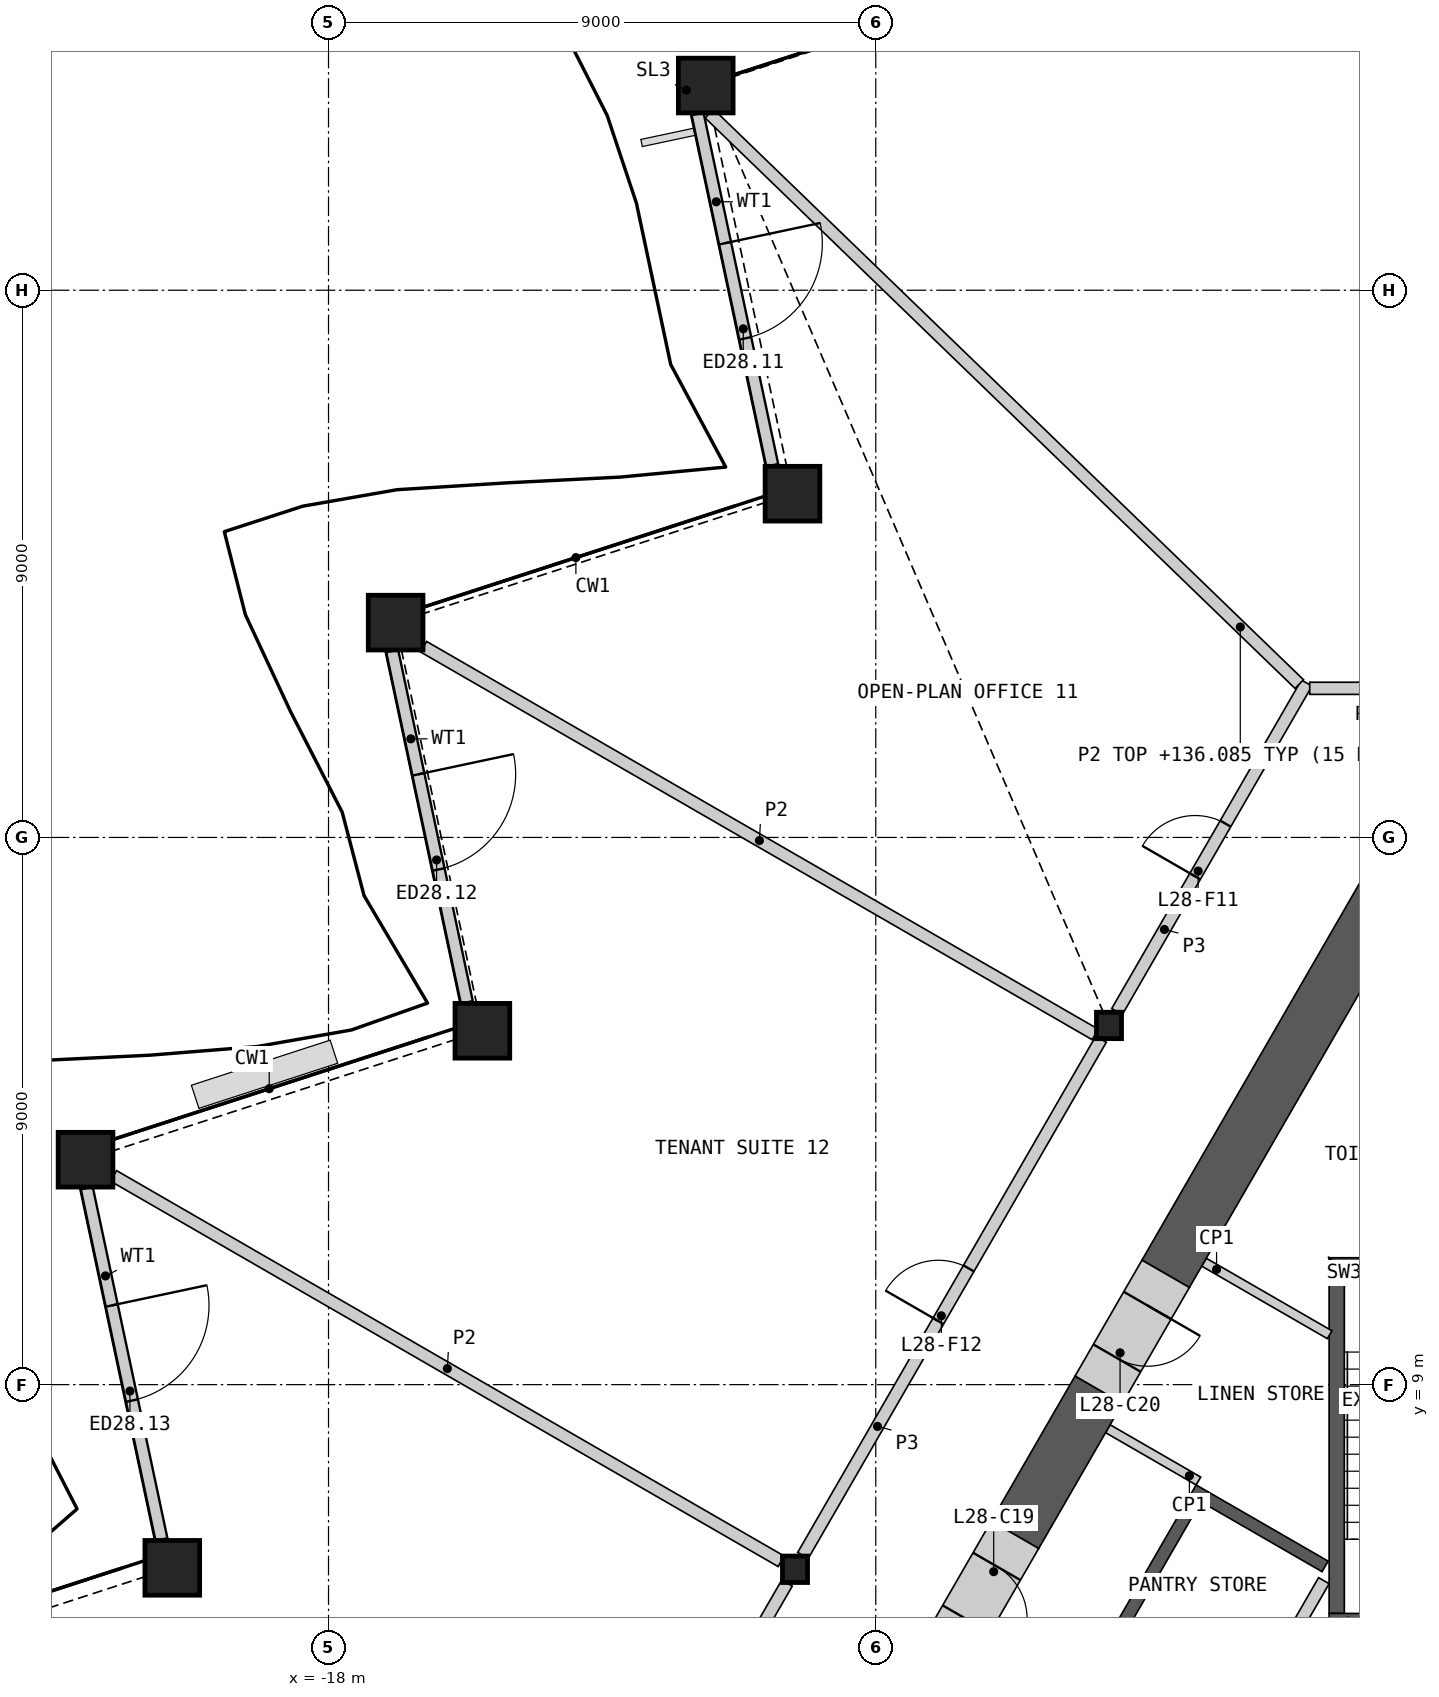
"""IFC4 building model, lengths in metres.
Left out: names, types, materials, properties, quantities, classifications, styles, units other than length and angle.
Written with IfcOpenShell. Run it as: python <this file> out.ifc"""

import sys

from ifc_helpers import new_model, si_unit, direction, frame, frame_2d, origin, origin_2d, place, context, subcontext, project, spatial, polyline, rectangle, hollow_rectangle, i_section, outline, extrude, element, fill, save


model = new_model("IFC4")
c1 = context("Model", 3, precision=1e-05, world=origin(), true_north=direction((0.0, 1.0)))
c2 = subcontext(c1, "Body", "Model", "MODEL_VIEW")
j1 = project(units=[si_unit("LENGTHUNIT", "METRE"), si_unit("PLANEANGLEUNIT", "RADIAN")], contexts=[c1])
p1 = place(None, origin())
s1 = spatial("IfcSite", under=j1, at=p1, CompositionType="ELEMENT")
p2 = place(p1, origin())
s2 = spatial("IfcBuilding", under=s1, at=p2, CompositionType="ELEMENT")
p3 = place(p2, frame((0.0, 0.0, 133.2)))
s3 = spatial("IfcBuildingStorey", under=s2, at=p3, CompositionType="ELEMENT", Elevation=133.2)
for number, where, z_axis, x_axis in (
    (1, (-11.796, 30.366, 0.0), (0.0, 0.0, 1.0), (1.0, 0.0, 0.0)),
    (2, (-10.37, 23.654, 0.0), (0.0, 0.0, 1.0), (1.0, 0.0, 0.0)),
    (3, (-16.896, 21.533, 0.0), (0.0, 0.0, 1.0), (1.0, 0.0, 0.0)),
    (4, (-15.469, 14.82, 0.0), (0.0, 0.0, 1.0), (1.0, 0.0, 0.0)),
    (5, (-21.996, 12.699, 0.0), (0.0, 0.0, 1.0), (1.0, 0.0, 0.0)),
    (6, (-20.57, 5.987, 0.0), (0.0, 0.0, 1.0), (1.0, 0.0, 0.0)),
):
    element("IfcColumn", number, at=place(p3, frame(where, z_axis=z_axis, x_axis=x_axis)), inside=s3, PredefinedType="COLUMN", context=c2, shape_type="SweptSolid", body=[
        extrude(hollow_rectangle(XDim=0.9, YDim=0.9, WallThickness=0.06, at=origin_2d()), origin(), (0.0, 0.0, 1.0), 4.2),
    ])
for number, where, z_axis, x_axis in (
    (7, (-5.164, 14.908, 0.0), (0.0, 0.0, 1.0), (1.0, 0.0, 0.0)),
    (8, (-10.328, 5.963, 0.0), (0.0, 0.0, 1.0), (1.0, 0.0, 0.0)),
):
    element("IfcColumn", number, at=place(p3, frame(where, z_axis=z_axis, x_axis=x_axis)), inside=s3, PredefinedType="COLUMN", context=c2, shape_type="SweptSolid", body=[
        extrude(i_section(OverallWidth=0.412, OverallDepth=0.435, WebThickness=0.036, FlangeThickness=0.057, at=origin_2d()), origin(), (0.0, 0.0, 1.0), 4.2),
    ])
p4 = place(p3, frame((-11.93, 29.9, 0.0), z_axis=(0.0, 0.0, 1.0), x_axis=(0.207917562075, -0.978146352741, 0.0)))
e9 = element("IfcWall", 9, at=p4, inside=s3, PredefinedType="SOLIDWALL", context=c2, shape_type="SweptSolid", body=[
    extrude(rectangle(XDim=5.909, YDim=0.2, at=frame_2d((2.954, 0.0))), origin(), (0.0, 0.0, 1.0), 3.189),
])
p5 = place(p4, frame((2.174, 0.0, 0.0)))
e10 = element("IfcOpeningElement", 10, at=p5, cuts=e9, PredefinedType="OPENING", context=c2, shape_type="SweptSolid", body=[
    extrude(rectangle(XDim=1.6, YDim=2.4, at=frame_2d((0.8, 1.2))), frame((0.0, 0.11, 0.0), z_axis=(0.0, -1.0, 0.0), x_axis=(1.0, 0.0, 0.0)), (0.0, 0.0, 1.0), 0.22),
])
p6 = place(p3, frame((-16.953, 21.066, 0.0), z_axis=(0.0, 0.0, 1.0), x_axis=(0.207917562075, -0.978146352741, 0.0)))
e11 = element("IfcWall", 11, at=p6, inside=s3, PredefinedType="SOLIDWALL", context=c2, shape_type="SweptSolid", body=[
    extrude(rectangle(XDim=5.909, YDim=0.2, at=frame_2d((2.954, 0.0))), origin(), (0.0, 0.0, 1.0), 3.189),
])
p7 = place(p6, frame((2.073, 0.0, 0.0)))
e12 = element("IfcOpeningElement", 12, at=p7, cuts=e11, PredefinedType="OPENING", context=c2, shape_type="SweptSolid", body=[
    extrude(rectangle(XDim=1.6, YDim=2.4, at=frame_2d((0.8, 1.2))), frame((0.0, 0.11, 0.0), z_axis=(0.0, -1.0, 0.0), x_axis=(1.0, 0.0, 0.0)), (0.0, 0.0, 1.0), 0.22),
])
p8 = place(p3, frame((-21.976, 12.233, 0.0), z_axis=(0.0, 0.0, 1.0), x_axis=(0.207925965623, -0.978144566421, 0.0)))
e13 = element("IfcWall", 13, at=p8, inside=s3, PredefinedType="SOLIDWALL", context=c2, shape_type="SweptSolid", body=[
    extrude(rectangle(XDim=5.908, YDim=0.2, at=frame_2d((2.954, 0.0))), origin(), (0.0, 0.0, 1.0), 3.189),
])
p9 = place(p8, frame((1.973, 0.0, 0.0)))
e14 = element("IfcOpeningElement", 14, at=p9, cuts=e13, PredefinedType="OPENING", context=c2, shape_type="SweptSolid", body=[
    extrude(rectangle(XDim=1.6, YDim=2.4, at=frame_2d((0.8, 1.2))), frame((0.0, 0.11, 0.0), z_axis=(0.0, -1.0, 0.0), x_axis=(1.0, 0.0, 0.0)), (0.0, 0.0, 1.0), 0.22),
])
p10 = place(p3, origin())
e15 = element("IfcWall", 15, at=p10, inside=s3, PredefinedType="SHEAR", context=c2, shape_type="SweptSolid", body=[
    extrude(outline(polyline([(-4.96, 0.208), (-7.131, 1.461), (-3.731, 7.35), (-1.561, 6.097), (-1.66, 5.924), (-3.652, 7.074), (-5.752, 3.437), (-3.76, 2.287), (-3.861, 2.113), (-5.852, 3.263), (-6.852, 1.531), (-4.861, 0.381), (-4.96, 0.208)])), origin(), (0.0, 0.0, 1.0), 3.8),
])
p11 = place(p3, frame((-1.631, 5.776, 0.0), z_axis=(0.0, 0.0, 1.0), x_axis=(-0.499992876559, -0.866029516466, 0.0)))
e16 = element("IfcWall", 16, at=p11, inside=s3, PredefinedType="SOLIDWALL", context=c2, shape_type="SweptSolid", body=[
    extrude(rectangle(XDim=6.486, YDim=0.2, at=frame_2d((3.243, 0.0))), origin(), (0.0, 0.0, 1.0), 3.8),
])
p12 = place(p11, frame((1.537, 0.0, 0.0)))
e17 = element("IfcOpeningElement", 17, at=p12, cuts=e16, PredefinedType="OPENING", context=c2, shape_type="SweptSolid", body=[
    extrude(rectangle(XDim=0.9, YDim=2.1, at=frame_2d((0.45, 1.05))), frame((0.0, 0.11, 0.0), z_axis=(0.0, -1.0, 0.0), x_axis=(1.0, 0.0, 0.0)), (0.0, 0.0, 1.0), 0.22),
])
p13 = place(p3, origin())
e18 = element("IfcWall", 18, at=p13, inside=s3, PredefinedType="SHEAR", context=c2, shape_type="SweptSolid", body=[
    extrude(outline(polyline([(1.544, 11.087), (-1.544, 11.087), (-1.294, 10.837), (1.294, 10.837), (1.544, 11.087)])), origin(), (0.0, 0.0, 1.0), 3.8),
])
p14 = place(p3, origin())
e19 = element("IfcWall", 19, at=p14, inside=s3, PredefinedType="SHEAR", context=c2, shape_type="SweptSolid", body=[
    extrude(outline(polyline([(-1.294, 10.837), (-1.544, 11.087), (-1.544, 5.237), (-1.294, 5.237), (-1.294, 10.837)])), origin(), (0.0, 0.0, 1.0), 3.8),
])
p15 = place(p3, frame((1.544, 5.112, 0.0), z_axis=(0.0, 0.0, 1.0), x_axis=(-1.0, 0.0, 0.0)))
e20 = element("IfcWall", 20, at=p15, inside=s3, PredefinedType="SHEAR", context=c2, shape_type="SweptSolid", body=[
    extrude(rectangle(XDim=3.088, YDim=0.25, at=frame_2d((1.544, 0.0))), origin(), (0.0, 0.0, 1.0), 3.8),
])
p16 = place(p15, frame((0.994, 0.0, 0.0)))
e21 = element("IfcOpeningElement", 21, at=p16, cuts=e20, PredefinedType="OPENING", context=c2, shape_type="SweptSolid", body=[
    extrude(rectangle(XDim=1.1, YDim=2.1, at=frame_2d((0.55, 1.05))), frame((0.0, 0.135, 0.0), z_axis=(0.0, -1.0, 0.0), x_axis=(1.0, 0.0, 0.0)), (0.0, 0.0, 1.0), 0.27),
])
p17 = place(p3, frame((-3.693, 7.415, 0.0), z_axis=(0.0, 0.0, 1.0), x_axis=(-0.866024871741, 0.500000921525, 0.0)))
e22 = element("IfcWall", 22, at=p17, inside=s3, PredefinedType="PARTITIONING", context=c2, shape_type="SweptSolid", body=[
    extrude(rectangle(XDim=1.72, YDim=0.15, at=frame_2d((0.86, 0.0))), origin(), (0.0, 0.0, 1.0), 3.8),
])
p18 = place(p3, frame((-3.602, 11.014, 0.0), z_axis=(0.0, 0.0, 1.0), x_axis=(0.866011787705, -0.500023583, 0.0)))
e23 = element("IfcWall", 23, at=p18, inside=s3, PredefinedType="PARTITIONING", context=c2, shape_type="SweptSolid", body=[
    extrude(rectangle(XDim=2.386, YDim=0.15, at=frame_2d((1.193, 0.0))), origin(), (0.0, 0.0, 1.0), 3.8),
])
p19 = place(p3, frame((-0.39, 17.478, 0.0), z_axis=(0.0, 0.0, 1.0), x_axis=(-0.500010285023, -0.866019465642, 0.0)))
e24 = element("IfcWall", 24, at=p19, inside=s3, PredefinedType="SHEAR", context=c2, shape_type="SweptSolid", body=[
    extrude(rectangle(XDim=7.685, YDim=0.9, at=frame_2d((3.842, 0.0))), origin(), (0.0, 0.0, 1.0), 3.8),
])
p20 = place(p3, frame((-5.332, 8.917, 0.0), z_axis=(0.0, 0.0, 1.0), x_axis=(-0.499949934511, -0.866054307178, 0.0)))
e25 = element("IfcWall", 25, at=p20, inside=s3, PredefinedType="SHEAR", context=c2, shape_type="SweptSolid", body=[
    extrude(rectangle(XDim=2.756, YDim=0.9, at=frame_2d((1.378, 0.0))), origin(), (0.0, 0.0, 1.0), 3.8),
])
p21 = place(p3, frame((-6.71, 6.53, 0.0), z_axis=(0.0, 0.0, 1.0), x_axis=(-0.50002983664, -0.866008176907, 0.0)))
e26 = element("IfcWall", 26, at=p21, inside=s3, PredefinedType="SHEAR", context=c2, shape_type="SweptSolid", body=[
    extrude(rectangle(XDim=2.2, YDim=0.9, at=frame_2d((1.1, 0.0))), origin(), (0.0, 0.0, 1.0), 3.8),
])
p22 = place(p21, frame((0.6, 0.0, 0.0)))
e27 = element("IfcOpeningElement", 27, at=p22, cuts=e26, PredefinedType="OPENING", context=c2, shape_type="SweptSolid", body=[
    extrude(rectangle(XDim=1.0, YDim=2.1, at=frame_2d((0.5, 1.05))), frame((0.0, 0.46, 0.0), z_axis=(0.0, -1.0, 0.0), x_axis=(1.0, 0.0, 0.0)), (0.0, 0.0, 1.0), 0.92),
])
p23 = place(p3, frame((-4.232, 10.822, 0.0), z_axis=(0.0, 0.0, 1.0), x_axis=(-0.50002983664, -0.866008176907, 0.0)))
e28 = element("IfcWall", 28, at=p23, inside=s3, PredefinedType="SHEAR", context=c2, shape_type="SweptSolid", body=[
    extrude(rectangle(XDim=2.2, YDim=0.9, at=frame_2d((1.1, 0.0))), origin(), (0.0, 0.0, 1.0), 3.8),
])
p24 = place(p23, frame((0.6, 0.0, 0.0)))
e29 = element("IfcOpeningElement", 29, at=p24, cuts=e28, PredefinedType="OPENING", context=c2, shape_type="SweptSolid", body=[
    extrude(rectangle(XDim=1.0, YDim=2.1, at=frame_2d((0.5, 1.05))), frame((0.0, 0.46, 0.0), z_axis=(0.0, -1.0, 0.0), x_axis=(1.0, 0.0, 0.0)), (0.0, 0.0, 1.0), 0.92),
])
p25 = place(p3, frame((-15.361, -2.754, 0.0), z_axis=(0.0, 0.0, 1.0), x_axis=(0.500004141693, 0.866023012564, 0.0)))
e30 = element("IfcWall", 30, at=p25, inside=s3, PredefinedType="PARTITIONING", context=c2, shape_type="SweptSolid", body=[
    extrude(rectangle(XDim=9.803, YDim=0.2, at=frame_2d((4.902, 0.0))), origin(), (0.0, 0.0, 1.0), 3.8),
])
p26 = place(p25, frame((4.452, 0.0, 0.0)))
e31 = element("IfcOpeningElement", 31, at=p26, cuts=e30, PredefinedType="OPENING", context=c2, shape_type="SweptSolid", body=[
    extrude(rectangle(XDim=1.0, YDim=2.1, at=frame_2d((0.5, 1.05))), frame((0.0, 0.11, 0.0), z_axis=(0.0, -1.0, 0.0), x_axis=(1.0, 0.0, 0.0)), (0.0, 0.0, 1.0), 0.22),
])
p27 = place(p3, frame((-10.197, 6.19, 0.0), z_axis=(0.0, 0.0, 1.0), x_axis=(0.500012035596, 0.866018454918, 0.0)))
e32 = element("IfcWall", 32, at=p27, inside=s3, PredefinedType="PARTITIONING", context=c2, shape_type="SweptSolid", body=[
    extrude(rectangle(XDim=9.803, YDim=0.2, at=frame_2d((4.902, 0.0))), origin(), (0.0, 0.0, 1.0), 3.8),
])
p28 = place(p27, frame((4.452, 0.0, 0.0)))
e33 = element("IfcOpeningElement", 33, at=p28, cuts=e32, PredefinedType="OPENING", context=c2, shape_type="SweptSolid", body=[
    extrude(rectangle(XDim=1.0, YDim=2.1, at=frame_2d((0.5, 1.05))), frame((0.0, 0.11, 0.0), z_axis=(0.0, -1.0, 0.0), x_axis=(1.0, 0.0, 0.0)), (0.0, 0.0, 1.0), 0.22),
])
p29 = place(p3, frame((-5.033, 15.135, 0.0), z_axis=(0.0, 0.0, 1.0), x_axis=(0.499980978912, 0.866036385336, 0.0)))
e34 = element("IfcWall", 34, at=p29, inside=s3, PredefinedType="PARTITIONING", context=c2, shape_type="SweptSolid", body=[
    extrude(rectangle(XDim=6.24, YDim=0.2, at=frame_2d((3.12, 0.0))), origin(), (0.0, 0.0, 1.0), 3.8),
])
p30 = place(p29, frame((2.57, 0.0, 0.0)))
e35 = element("IfcOpeningElement", 35, at=p30, cuts=e34, PredefinedType="OPENING", context=c2, shape_type="SweptSolid", body=[
    extrude(rectangle(XDim=1.0, YDim=2.1, at=frame_2d((0.5, 1.05))), frame((0.0, 0.11, 0.0), z_axis=(0.0, -1.0, 0.0), x_axis=(1.0, 0.0, 0.0)), (0.0, 0.0, 1.0), 0.22),
])
p31 = place(p3, frame((-1.863, 20.453, 0.0), z_axis=(0.0, 0.0, 1.0), x_axis=(1.0, 0.0, 0.0)))
e36 = element("IfcWall", 36, at=p31, inside=s3, PredefinedType="PARTITIONING", context=c2, shape_type="SweptSolid", body=[
    extrude(rectangle(XDim=3.726, YDim=0.2, at=frame_2d((1.863, 0.0))), origin(), (0.0, 0.0, 1.0), 3.8),
])
p32 = place(p31, frame((0.963, 0.0, 0.0)))
e37 = element("IfcOpeningElement", 37, at=p32, cuts=e36, PredefinedType="OPENING", context=c2, shape_type="SweptSolid", body=[
    extrude(rectangle(XDim=1.8, YDim=2.1, at=frame_2d((0.9, 1.05))), frame((0.0, 0.11, 0.0), z_axis=(0.0, -1.0, 0.0), x_axis=(1.0, 0.0, 0.0)), (0.0, 0.0, 1.0), 0.22),
])
p33 = place(p3, frame((-11.737, 29.906, 0.0), z_axis=(0.0, 0.0, 1.0), x_axis=(0.718783474817, -0.695234001132, 0.0)))
e38 = element("IfcWall", 38, at=p33, inside=s3, PredefinedType="PARTITIONING", context=c2, shape_type="SweptSolid", body=[
    extrude(rectangle(XDim=13.498, YDim=0.2, at=frame_2d((6.749, 0.0))), origin(), (0.0, 0.0, 1.0), 2.885),
])
p34 = place(p3, frame((-16.436, 21.137, 0.0), z_axis=(0.0, 0.0, 1.0), x_axis=(0.866023321739, -0.500003606191, 0.0)))
e39 = element("IfcWall", 39, at=p34, inside=s3, PredefinedType="PARTITIONING", context=c2, shape_type="SweptSolid", body=[
    extrude(rectangle(XDim=12.753, YDim=0.2, at=frame_2d((6.377, 0.0))), origin(), (0.0, 0.0, 1.0), 2.885),
])
p35 = place(p3, frame((-21.536, 12.434, 0.0), z_axis=(0.0, 0.0, 1.0), x_axis=(0.86602461759, -0.500001361726, 0.0)))
e40 = element("IfcWall", 40, at=p35, inside=s3, PredefinedType="PARTITIONING", context=c2, shape_type="SweptSolid", body=[
    extrude(rectangle(XDim=12.679, YDim=0.2, at=frame_2d((6.34, 0.0))), origin(), (0.0, 0.0, 1.0), 2.885),
])
p36 = place(p5, origin())
e41 = element("IfcDoor", 41, at=p36, inside=s3, OperationType="DOUBLE_DOOR_SINGLE_SWING", PredefinedType="DOOR", context=c2, shape_type="SweptSolid", body=[
    extrude(rectangle(XDim=1.6, YDim=2.4, at=frame_2d((0.8, 1.2))), frame((0.0, 0.025, 0.0), z_axis=(0.0, -1.0, 0.0), x_axis=(1.0, 0.0, 0.0)), (0.0, 0.0, 1.0), 0.05),
])
fill(e10, e41)
p37 = place(p7, origin())
e42 = element("IfcDoor", 42, at=p37, inside=s3, OperationType="DOUBLE_DOOR_SINGLE_SWING", PredefinedType="DOOR", context=c2, shape_type="SweptSolid", body=[
    extrude(rectangle(XDim=1.6, YDim=2.4, at=frame_2d((0.8, 1.2))), frame((0.0, 0.025, 0.0), z_axis=(0.0, -1.0, 0.0), x_axis=(1.0, 0.0, 0.0)), (0.0, 0.0, 1.0), 0.05),
])
fill(e12, e42)
p38 = place(p9, origin())
e43 = element("IfcDoor", 43, at=p38, inside=s3, OperationType="DOUBLE_DOOR_SINGLE_SWING", PredefinedType="DOOR", context=c2, shape_type="SweptSolid", body=[
    extrude(rectangle(XDim=1.6, YDim=2.4, at=frame_2d((0.8, 1.2))), frame((0.0, 0.025, 0.0), z_axis=(0.0, -1.0, 0.0), x_axis=(1.0, 0.0, 0.0)), (0.0, 0.0, 1.0), 0.05),
])
fill(e14, e43)
p39 = place(p22, origin())
e44 = element("IfcDoor", 44, at=p39, inside=s3, OperationType="SINGLE_SWING_RIGHT", PredefinedType="DOOR", context=c2, shape_type="SweptSolid", body=[
    extrude(rectangle(XDim=1.0, YDim=2.1, at=frame_2d((0.5, 1.05))), frame((0.0, 0.205, 0.0), z_axis=(0.0, -1.0, 0.0), x_axis=(1.0, 0.0, 0.0)), (0.0, 0.0, 1.0), 0.05),
])
fill(e27, e44)
p40 = place(p24, origin())
e45 = element("IfcDoor", 45, at=p40, inside=s3, OperationType="SINGLE_SWING_LEFT", PredefinedType="DOOR", context=c2, shape_type="SweptSolid", body=[
    extrude(rectangle(XDim=1.0, YDim=2.1, at=frame_2d((0.5, 1.05))), frame((0.0, 0.205, 0.0), z_axis=(0.0, -1.0, 0.0), x_axis=(1.0, 0.0, 0.0)), (0.0, 0.0, 1.0), 0.05),
])
fill(e29, e45)
p41 = place(p30, origin())
e46 = element("IfcDoor", 46, at=p41, inside=s3, OperationType="SINGLE_SWING_LEFT", PredefinedType="DOOR", context=c2, shape_type="SweptSolid", body=[
    extrude(rectangle(XDim=1.0, YDim=2.1, at=frame_2d((0.5, 1.05))), frame((0.0, 0.025, 0.0), z_axis=(0.0, -1.0, 0.0), x_axis=(1.0, 0.0, 0.0)), (0.0, 0.0, 1.0), 0.05),
])
fill(e35, e46)
p42 = place(p28, origin())
e47 = element("IfcDoor", 47, at=p42, inside=s3, OperationType="SINGLE_SWING_LEFT", PredefinedType="DOOR", context=c2, shape_type="SweptSolid", body=[
    extrude(rectangle(XDim=1.0, YDim=2.1, at=frame_2d((0.5, 1.05))), frame((0.0, 0.025, 0.0), z_axis=(0.0, -1.0, 0.0), x_axis=(1.0, 0.0, 0.0)), (0.0, 0.0, 1.0), 0.05),
])
fill(e33, e47)
save(model, sys.argv[1])
